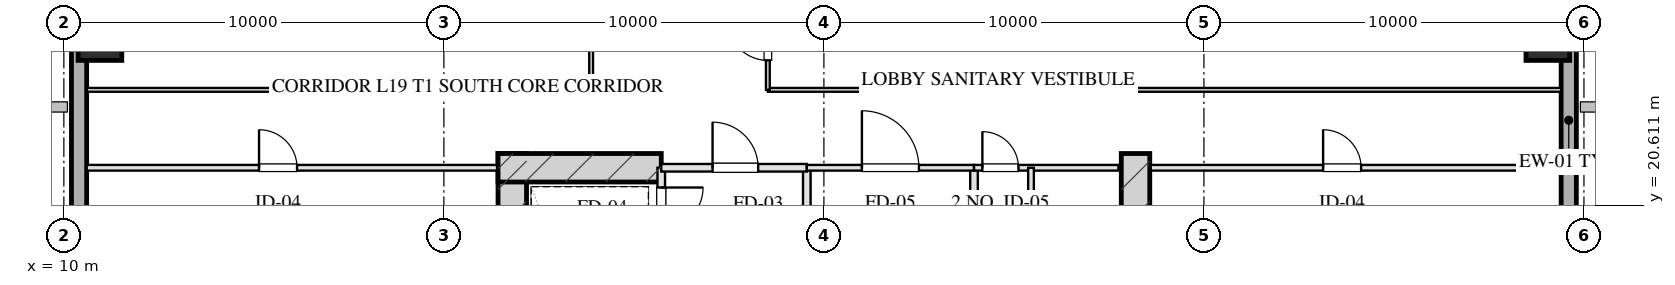
"""IFC4 building model, lengths in metres.
Left out: names, types, materials, properties, quantities, classifications, styles, units other than length and angle.
Written with IfcOpenShell. Run it as: python <this file> out.ifc"""

import sys

from ifc_helpers import new_model, si_unit, direction, frame, frame_2d, origin, origin_2d, place, context, subcontext, project, spatial, rectangle, hollow_rectangle, extrude, element, fill, save


model = new_model("IFC4")
c1 = context("Model", 3, precision=1e-05, world=origin(), true_north=direction((0.0, 1.0)))
c2 = subcontext(c1, "Body", "Model", "MODEL_VIEW")
j1 = project(units=[si_unit("LENGTHUNIT", "METRE"), si_unit("PLANEANGLEUNIT", "RADIAN")], contexts=[c1])
p1 = place(None, origin())
s1 = spatial("IfcSite", under=j1, at=p1, CompositionType="ELEMENT")
p2 = place(p1, origin())
s2 = spatial("IfcBuilding", under=s1, at=p2, CompositionType="ELEMENT")
p3 = place(p2, frame((0.0, 0.0, 78.2)))
s3 = spatial("IfcBuildingStorey", under=s2, at=p3, CompositionType="ELEMENT", Elevation=78.2)
for number, where, z_axis, x_axis in (
    (1, (21.8, 21.975, 0.0), (0.0, 0.0, 1.0), (0.0, -1.0, 0.0)),
    (2, (38.2, 21.975, 0.0), (0.0, 0.0, 1.0), (0.0, -1.0, 0.0)),
):
    element("IfcWall", number, at=place(p3, frame(where, z_axis=z_axis, x_axis=x_axis)), inside=s3, PredefinedType="SHEAR", context=c2, shape_type="SweptSolid", body=[
        extrude(rectangle(XDim=9.63, YDim=0.75, at=frame_2d((4.815, 0.0))), origin(), (0.0, 0.0, 1.0), 3.45),
    ])
p4 = place(p3, frame((21.425, 21.6, 0.0), z_axis=(0.0, 0.0, 1.0), x_axis=(1.0, 0.0, 0.0)))
e3 = element("IfcWall", 3, at=p4, inside=s3, PredefinedType="SHEAR", context=c2, shape_type="SweptSolid", body=[
    extrude(rectangle(XDim=4.295, YDim=0.75, at=frame_2d((2.147, 0.0))), origin(), (0.0, 0.0, 1.0), 3.45),
])
for number, where, z_axis, x_axis in (
    (4, (10.95, 25.0, 0.0), (0.0, 0.0, 1.0), (1.0, 0.0, 0.0)),
    (5, (49.05, 25.0, 0.0), (0.0, 0.0, 1.0), (1.0, 0.0, 0.0)),
):
    element("IfcColumn", number, at=place(p3, frame(where, z_axis=z_axis, x_axis=x_axis)), inside=s3, PredefinedType="COLUMN", context=c2, shape_type="SweptSolid", body=[
        extrude(hollow_rectangle(XDim=1.15, YDim=1.15, WallThickness=0.04, at=origin_2d()), origin(), (0.0, 0.0, 1.0), 3.451),
    ])
p5 = place(p3, frame((10.4, 7.2, 0.0), z_axis=(0.0, 0.0, 1.0), x_axis=(0.0, 1.0, 0.0)))
e6 = element("IfcWall", 6, at=p5, inside=s3, PredefinedType="SOLIDWALL", context=c2, shape_type="SweptSolid", body=[
    extrude(rectangle(XDim=53.6, YDim=0.4, at=frame_2d((26.8, 0.0))), origin(), (0.0, 0.0, 1.0), 2.61),
])
p6 = place(p5, frame((19.2, 0.0, 0.75)))
e7 = element("IfcOpeningElement", 7, at=p6, cuts=e6, PredefinedType="OPENING", context=c2, shape_type="SweptSolid", body=[
    extrude(rectangle(XDim=2.4, YDim=1.46, at=frame_2d((1.2, 0.73))), frame((0.0, 0.21, 0.0), z_axis=(0.0, -1.0, 0.0), x_axis=(1.0, 0.0, 0.0)), (0.0, 0.0, 1.0), 0.42),
])
p7 = place(p5, frame((30.65, 0.0, 0.0)))
e8 = element("IfcOpeningElement", 8, at=p7, cuts=e6, PredefinedType="OPENING", context=c2, shape_type="SweptSolid", body=[
    extrude(rectangle(XDim=1.1, YDim=2.15, at=frame_2d((0.55, 1.075))), frame((0.0, 0.21, 0.0), z_axis=(0.0, -1.0, 0.0), x_axis=(1.0, 0.0, 0.0)), (0.0, 0.0, 1.0), 0.42),
])
p8 = place(p3, frame((49.6, 60.8, 0.0), z_axis=(0.0, 0.0, 1.0), x_axis=(0.0, -1.0, 0.0)))
e9 = element("IfcWall", 9, at=p8, inside=s3, PredefinedType="SOLIDWALL", context=c2, shape_type="SweptSolid", body=[
    extrude(rectangle(XDim=53.6, YDim=0.4, at=frame_2d((26.8, 0.0))), origin(), (0.0, 0.0, 1.0), 2.61),
])
p9 = place(p8, frame((20.45, 0.0, 0.0)))
e10 = element("IfcOpeningElement", 10, at=p9, cuts=e9, PredefinedType="OPENING", context=c2, shape_type="SweptSolid", body=[
    extrude(rectangle(XDim=1.1, YDim=2.15, at=frame_2d((0.55, 1.075))), frame((0.0, 0.21, 0.0), z_axis=(0.0, -1.0, 0.0), x_axis=(1.0, 0.0, 0.0)), (0.0, 0.0, 1.0), 0.42),
])
p10 = place(p3, frame((25.72, 21.6, 0.0), z_axis=(0.0, 0.0, 1.0), x_axis=(0.0, -1.0, 0.0)))
e11 = element("IfcWall", 11, at=p10, inside=s3, PredefinedType="PARTITIONING", context=c2, shape_type="SweptSolid", body=[
    extrude(rectangle(XDim=1.9, YDim=0.2, at=frame_2d((0.95, 0.0))), origin(), (0.0, 0.0, 1.0), 3.175),
])
p11 = place(p10, frame((0.52, 0.0, 0.0)))
e12 = element("IfcOpeningElement", 12, at=p11, cuts=e11, PredefinedType="OPENING", context=c2, shape_type="SweptSolid", body=[
    extrude(rectangle(XDim=1.1, YDim=2.05, at=frame_2d((0.55, 1.025))), frame((0.0, 0.11, 0.0), z_axis=(0.0, -1.0, 0.0), x_axis=(1.0, 0.0, 0.0)), (0.0, 0.0, 1.0), 0.22),
])
p12 = place(p3, frame((29.55, 21.6, 0.0), z_axis=(0.0, 0.0, 1.0), x_axis=(0.0, -1.0, 0.0)))
e13 = element("IfcWall", 13, at=p12, inside=s3, PredefinedType="PARTITIONING", context=c2, shape_type="SweptSolid", body=[
    extrude(rectangle(XDim=8.43, YDim=0.2, at=frame_2d((4.215, 0.0))), origin(), (0.0, 0.0, 1.0), 3.175),
])
p13 = place(p3, frame((25.72, 21.6, 0.0), z_axis=(0.0, 0.0, 1.0), x_axis=(1.0, 0.0, 0.0)))
e14 = element("IfcWall", 14, at=p13, inside=s3, PredefinedType="PARTITIONING", context=c2, shape_type="SweptSolid", body=[
    extrude(rectangle(XDim=3.83, YDim=0.2, at=frame_2d((1.915, 0.0))), origin(), (0.0, 0.0, 1.0), 3.175),
])
p14 = place(p13, frame((1.35, 0.0, 0.0)))
e15 = element("IfcOpeningElement", 15, at=p14, cuts=e14, PredefinedType="OPENING", context=c2, shape_type="SweptSolid", body=[
    extrude(rectangle(XDim=1.2, YDim=2.05, at=frame_2d((0.6, 1.025))), frame((0.0, 0.11, 0.0), z_axis=(0.0, -1.0, 0.0), x_axis=(1.0, 0.0, 0.0)), (0.0, 0.0, 1.0), 0.22),
])
p15 = place(p3, frame((33.95, 21.6, 0.0), z_axis=(0.0, 0.0, 1.0), x_axis=(0.0, -1.0, 0.0)))
e16 = element("IfcWall", 16, at=p15, inside=s3, PredefinedType="PARTITIONING", context=c2, shape_type="SweptSolid", body=[
    extrude(rectangle(XDim=8.43, YDim=0.2, at=frame_2d((4.215, 0.0))), origin(), (0.0, 0.0, 1.0), 3.175),
])
p16 = place(p3, frame((29.55, 21.6, 0.0), z_axis=(0.0, 0.0, 1.0), x_axis=(1.0, 0.0, 0.0)))
e17 = element("IfcWall", 17, at=p16, inside=s3, PredefinedType="PARTITIONING", context=c2, shape_type="SweptSolid", body=[
    extrude(rectangle(XDim=4.4, YDim=0.15, at=frame_2d((2.2, 0.0))), origin(), (0.0, 0.0, 1.0), 3.175),
])
p17 = place(p16, frame((1.45, 0.0, 0.0)))
e18 = element("IfcOpeningElement", 18, at=p17, cuts=e17, PredefinedType="OPENING", context=c2, shape_type="SweptSolid", body=[
    extrude(rectangle(XDim=1.5, YDim=2.05, at=frame_2d((0.75, 1.025))), frame((0.0, 0.085, 0.0), z_axis=(0.0, -1.0, 0.0), x_axis=(1.0, 0.0, 0.0)), (0.0, 0.0, 1.0), 0.17),
])
p18 = place(p3, frame((33.95, 21.6, 0.0), z_axis=(0.0, 0.0, 1.0), x_axis=(1.0, 0.0, 0.0)))
e19 = element("IfcWall", 19, at=p18, inside=s3, PredefinedType="PARTITIONING", context=c2, shape_type="SweptSolid", body=[
    extrude(rectangle(XDim=3.8, YDim=0.15, at=frame_2d((1.9, 0.0))), origin(), (0.0, 0.0, 1.0), 3.175),
])
p19 = place(p18, frame((0.22, 0.0, 0.0)))
e20 = element("IfcOpeningElement", 20, at=p19, cuts=e19, PredefinedType="OPENING", context=c2, shape_type="SweptSolid", body=[
    extrude(rectangle(XDim=0.95, YDim=2.05, at=frame_2d((0.475, 1.025))), frame((0.0, 0.085, 0.0), z_axis=(0.0, -1.0, 0.0), x_axis=(1.0, 0.0, 0.0)), (0.0, 0.0, 1.0), 0.17),
])
p20 = place(p3, frame((35.45, 21.6, 0.0), z_axis=(0.0, 0.0, 1.0), x_axis=(0.0, -1.0, 0.0)))
e21 = element("IfcWall", 21, at=p20, inside=s3, PredefinedType="PARTITIONING", context=c2, shape_type="SweptSolid", body=[
    extrude(rectangle(XDim=8.43, YDim=0.15, at=frame_2d((4.215, 0.0))), origin(), (0.0, 0.0, 1.0), 2.815),
])
p21 = place(p20, frame((2.55, 0.0, 0.0)))
e22 = element("IfcOpeningElement", 22, at=p21, cuts=e21, PredefinedType="OPENING", context=c2, shape_type="SweptSolid", body=[
    extrude(rectangle(XDim=0.95, YDim=2.05, at=frame_2d((0.475, 1.025))), frame((0.0, 0.085, 0.0), z_axis=(0.0, -1.0, 0.0), x_axis=(1.0, 0.0, 0.0)), (0.0, 0.0, 1.0), 0.17),
])
p22 = place(p20, frame((4.7, 0.0, 0.0)))
e23 = element("IfcOpeningElement", 23, at=p22, cuts=e21, PredefinedType="OPENING", context=c2, shape_type="SweptSolid", body=[
    extrude(rectangle(XDim=0.9, YDim=2.05, at=frame_2d((0.45, 1.025))), frame((0.0, 0.085, 0.0), z_axis=(0.0, -1.0, 0.0), x_axis=(1.0, 0.0, 0.0)), (0.0, 0.0, 1.0), 0.17),
])
p23 = place(p20, frame((6.8, 0.0, 0.0)))
e24 = element("IfcOpeningElement", 24, at=p23, cuts=e21, PredefinedType="OPENING", context=c2, shape_type="SweptSolid", body=[
    extrude(rectangle(XDim=0.9, YDim=2.05, at=frame_2d((0.45, 1.025))), frame((0.0, 0.085, 0.0), z_axis=(0.0, -1.0, 0.0), x_axis=(1.0, 0.0, 0.0)), (0.0, 0.0, 1.0), 0.17),
])
p24 = place(p3, frame((10.6, 21.6, 0.0), z_axis=(0.0, 0.0, 1.0), x_axis=(1.0, 0.0, 0.0)))
e25 = element("IfcWall", 25, at=p24, inside=s3, PredefinedType="PARTITIONING", context=c2, shape_type="SweptSolid", body=[
    extrude(rectangle(XDim=10.8, YDim=0.15, at=frame_2d((5.4, 0.0))), origin(), (0.0, 0.0, 1.0), 3.175),
])
p25 = place(p24, frame((4.536, 0.0, 0.0)))
e26 = element("IfcOpeningElement", 26, at=p25, cuts=e25, PredefinedType="OPENING", context=c2, shape_type="SweptSolid", body=[
    extrude(rectangle(XDim=1.0, YDim=2.05, at=frame_2d((0.5, 1.025))), frame((0.0, 0.085, 0.0), z_axis=(0.0, -1.0, 0.0), x_axis=(1.0, 0.0, 0.0)), (0.0, 0.0, 1.0), 0.17),
])
p26 = place(p3, frame((38.6, 21.6, 0.0), z_axis=(0.0, 0.0, 1.0), x_axis=(1.0, 0.0, 0.0)))
e27 = element("IfcWall", 27, at=p26, inside=s3, PredefinedType="PARTITIONING", context=c2, shape_type="SweptSolid", body=[
    extrude(rectangle(XDim=10.8, YDim=0.15, at=frame_2d((5.4, 0.0))), origin(), (0.0, 0.0, 1.0), 3.175),
])
p27 = place(p26, frame((4.536, 0.0, 0.0)))
e28 = element("IfcOpeningElement", 28, at=p27, cuts=e27, PredefinedType="OPENING", context=c2, shape_type="SweptSolid", body=[
    extrude(rectangle(XDim=1.0, YDim=2.05, at=frame_2d((0.5, 1.025))), frame((0.0, 0.085, 0.0), z_axis=(0.0, -1.0, 0.0), x_axis=(1.0, 0.0, 0.0)), (0.0, 0.0, 1.0), 0.17),
])
p28 = place(p3, frame((10.6, 23.65, 0.0), z_axis=(0.0, 0.0, 1.0), x_axis=(1.0, 0.0, 0.0)))
e29 = element("IfcWall", 29, at=p28, inside=s3, PredefinedType="MOVABLE", context=c2, shape_type="SweptSolid", body=[
    extrude(rectangle(XDim=13.275, YDim=0.1, at=frame_2d((6.637, 0.0))), origin(), (0.0, 0.0, 1.0), 3.175),
])
p29 = place(p3, frame((28.525, 23.65, 0.0), z_axis=(0.0, 0.0, 1.0), x_axis=(1.0, 0.0, 0.0)))
e30 = element("IfcWall", 30, at=p29, inside=s3, PredefinedType="MOVABLE", context=c2, shape_type="SweptSolid", body=[
    extrude(rectangle(XDim=20.875, YDim=0.1, at=frame_2d((10.438, 0.0))), origin(), (0.0, 0.0, 1.0), 3.175),
])
p30 = place(p3, frame((23.875, 23.65, 0.0), z_axis=(0.0, 0.0, 1.0), x_axis=(0.0, 1.0, 0.0)))
e31 = element("IfcWall", 31, at=p30, inside=s3, PredefinedType="MOVABLE", context=c2, shape_type="SweptSolid", body=[
    extrude(rectangle(XDim=20.7, YDim=0.1, at=frame_2d((10.35, 0.0))), origin(), (0.0, 0.0, 1.0), 3.175),
])
p31 = place(p30, frame((4.075, 0.0, 0.0)))
e32 = element("IfcOpeningElement", 32, at=p31, cuts=e31, PredefinedType="OPENING", context=c2, shape_type="SweptSolid", body=[
    extrude(rectangle(XDim=1.0, YDim=2.05, at=frame_2d((0.5, 1.025))), frame((0.0, 0.06, 0.0), z_axis=(0.0, -1.0, 0.0), x_axis=(1.0, 0.0, 0.0)), (0.0, 0.0, 1.0), 0.12),
])
p32 = place(p30, frame((14.425, 0.0, 0.0)))
e33 = element("IfcOpeningElement", 33, at=p32, cuts=e31, PredefinedType="OPENING", context=c2, shape_type="SweptSolid", body=[
    extrude(rectangle(XDim=1.0, YDim=2.05, at=frame_2d((0.5, 1.025))), frame((0.0, 0.06, 0.0), z_axis=(0.0, -1.0, 0.0), x_axis=(1.0, 0.0, 0.0)), (0.0, 0.0, 1.0), 0.12),
])
p33 = place(p3, frame((28.525, 23.65, 0.0), z_axis=(0.0, 0.0, 1.0), x_axis=(0.0, 1.0, 0.0)))
e34 = element("IfcWall", 34, at=p33, inside=s3, PredefinedType="MOVABLE", context=c2, shape_type="SweptSolid", body=[
    extrude(rectangle(XDim=20.7, YDim=0.1, at=frame_2d((10.35, 0.0))), origin(), (0.0, 0.0, 1.0), 3.175),
])
p34 = place(p33, frame((0.775, 0.0, 0.0)))
e35 = element("IfcOpeningElement", 35, at=p34, cuts=e34, PredefinedType="OPENING", context=c2, shape_type="SweptSolid", body=[
    extrude(rectangle(XDim=1.05, YDim=2.05, at=frame_2d((0.525, 1.025))), frame((0.0, 0.06, 0.0), z_axis=(0.0, -1.0, 0.0), x_axis=(1.0, 0.0, 0.0)), (0.0, 0.0, 1.0), 0.12),
])
p35 = place(p33, frame((3.95, 0.0, 0.0)))
e36 = element("IfcOpeningElement", 36, at=p35, cuts=e34, PredefinedType="OPENING", context=c2, shape_type="SweptSolid", body=[
    extrude(rectangle(XDim=1.0, YDim=2.05, at=frame_2d((0.5, 1.025))), frame((0.0, 0.06, 0.0), z_axis=(0.0, -1.0, 0.0), x_axis=(1.0, 0.0, 0.0)), (0.0, 0.0, 1.0), 0.12),
])
p36 = place(p33, frame((7.51, 0.0, 0.0)))
e37 = element("IfcOpeningElement", 37, at=p36, cuts=e34, PredefinedType="OPENING", context=c2, shape_type="SweptSolid", body=[
    extrude(rectangle(XDim=1.0, YDim=2.05, at=frame_2d((0.5, 1.025))), frame((0.0, 0.06, 0.0), z_axis=(0.0, -1.0, 0.0), x_axis=(1.0, 0.0, 0.0)), (0.0, 0.0, 1.0), 0.12),
])
p37 = place(p33, frame((11.51, 0.0, 0.0)))
e38 = element("IfcOpeningElement", 38, at=p37, cuts=e34, PredefinedType="OPENING", context=c2, shape_type="SweptSolid", body=[
    extrude(rectangle(XDim=1.0, YDim=2.05, at=frame_2d((0.5, 1.025))), frame((0.0, 0.06, 0.0), z_axis=(0.0, -1.0, 0.0), x_axis=(1.0, 0.0, 0.0)), (0.0, 0.0, 1.0), 0.12),
])
p38 = place(p33, frame((15.75, 0.0, 0.0)))
e39 = element("IfcOpeningElement", 39, at=p38, cuts=e34, PredefinedType="OPENING", context=c2, shape_type="SweptSolid", body=[
    extrude(rectangle(XDim=1.0, YDim=2.05, at=frame_2d((0.5, 1.025))), frame((0.0, 0.06, 0.0), z_axis=(0.0, -1.0, 0.0), x_axis=(1.0, 0.0, 0.0)), (0.0, 0.0, 1.0), 0.12),
])
p39 = place(p33, frame((19.185, 0.0, 0.0)))
e40 = element("IfcOpeningElement", 40, at=p39, cuts=e34, PredefinedType="OPENING", context=c2, shape_type="SweptSolid", body=[
    extrude(rectangle(XDim=1.0, YDim=2.05, at=frame_2d((0.5, 1.025))), frame((0.0, 0.06, 0.0), z_axis=(0.0, -1.0, 0.0), x_axis=(1.0, 0.0, 0.0)), (0.0, 0.0, 1.0), 0.12),
])
p40 = place(p11, origin())
e41 = element("IfcDoor", 41, at=p40, inside=s3, OperationType="SINGLE_SWING_LEFT", PredefinedType="DOOR", context=c2, shape_type="SweptSolid", body=[
    extrude(rectangle(XDim=1.1, YDim=2.05, at=frame_2d((0.55, 1.025))), frame((0.0, 0.025, 0.0), z_axis=(0.0, -1.0, 0.0), x_axis=(1.0, 0.0, 0.0)), (0.0, 0.0, 1.0), 0.05),
])
fill(e12, e41)
p41 = place(p14, origin())
e42 = element("IfcDoor", 42, at=p41, inside=s3, OperationType="SINGLE_SWING_LEFT", PredefinedType="DOOR", context=c2, shape_type="SweptSolid", body=[
    extrude(rectangle(XDim=1.2, YDim=2.05, at=frame_2d((0.6, 1.025))), frame((0.0, 0.025, 0.0), z_axis=(0.0, -1.0, 0.0), x_axis=(1.0, 0.0, 0.0)), (0.0, 0.0, 1.0), 0.05),
])
fill(e15, e42)
p42 = place(p17, origin())
e43 = element("IfcDoor", 43, at=p42, inside=s3, OperationType="SINGLE_SWING_LEFT", PredefinedType="DOOR", context=c2, shape_type="SweptSolid", body=[
    extrude(rectangle(XDim=1.5, YDim=2.05, at=frame_2d((0.75, 1.025))), frame((0.0, 0.025, 0.0), z_axis=(0.0, -1.0, 0.0), x_axis=(1.0, 0.0, 0.0)), (0.0, 0.0, 1.0), 0.05),
])
fill(e18, e43)
p43 = place(p19, origin())
e44 = element("IfcDoor", 44, at=p43, inside=s3, OperationType="SINGLE_SWING_LEFT", PredefinedType="DOOR", context=c2, shape_type="SweptSolid", body=[
    extrude(rectangle(XDim=0.95, YDim=2.05, at=frame_2d((0.475, 1.025))), frame((0.0, 0.025, 0.0), z_axis=(0.0, -1.0, 0.0), x_axis=(1.0, 0.0, 0.0)), (0.0, 0.0, 1.0), 0.05),
])
fill(e20, e44)
p44 = place(p25, origin())
e45 = element("IfcDoor", 45, at=p44, inside=s3, OperationType="SINGLE_SWING_LEFT", PredefinedType="DOOR", context=c2, shape_type="SweptSolid", body=[
    extrude(rectangle(XDim=1.0, YDim=2.05, at=frame_2d((0.5, 1.025))), frame((0.0, 0.025, 0.0), z_axis=(0.0, -1.0, 0.0), x_axis=(1.0, 0.0, 0.0)), (0.0, 0.0, 1.0), 0.05),
])
fill(e26, e45)
p45 = place(p27, origin())
e46 = element("IfcDoor", 46, at=p45, inside=s3, OperationType="SINGLE_SWING_LEFT", PredefinedType="DOOR", context=c2, shape_type="SweptSolid", body=[
    extrude(rectangle(XDim=1.0, YDim=2.05, at=frame_2d((0.5, 1.025))), frame((0.0, 0.025, 0.0), z_axis=(0.0, -1.0, 0.0), x_axis=(1.0, 0.0, 0.0)), (0.0, 0.0, 1.0), 0.05),
])
fill(e28, e46)
p46 = place(p34, origin())
e47 = element("IfcDoor", 47, at=p46, inside=s3, OperationType="SINGLE_SWING_RIGHT", PredefinedType="DOOR", context=c2, shape_type="SweptSolid", body=[
    extrude(rectangle(XDim=1.05, YDim=2.05, at=frame_2d((0.525, 1.025))), frame((0.0, 0.025, 0.0), z_axis=(0.0, -1.0, 0.0), x_axis=(1.0, 0.0, 0.0)), (0.0, 0.0, 1.0), 0.05),
])
fill(e35, e47)
save(model, sys.argv[1])
